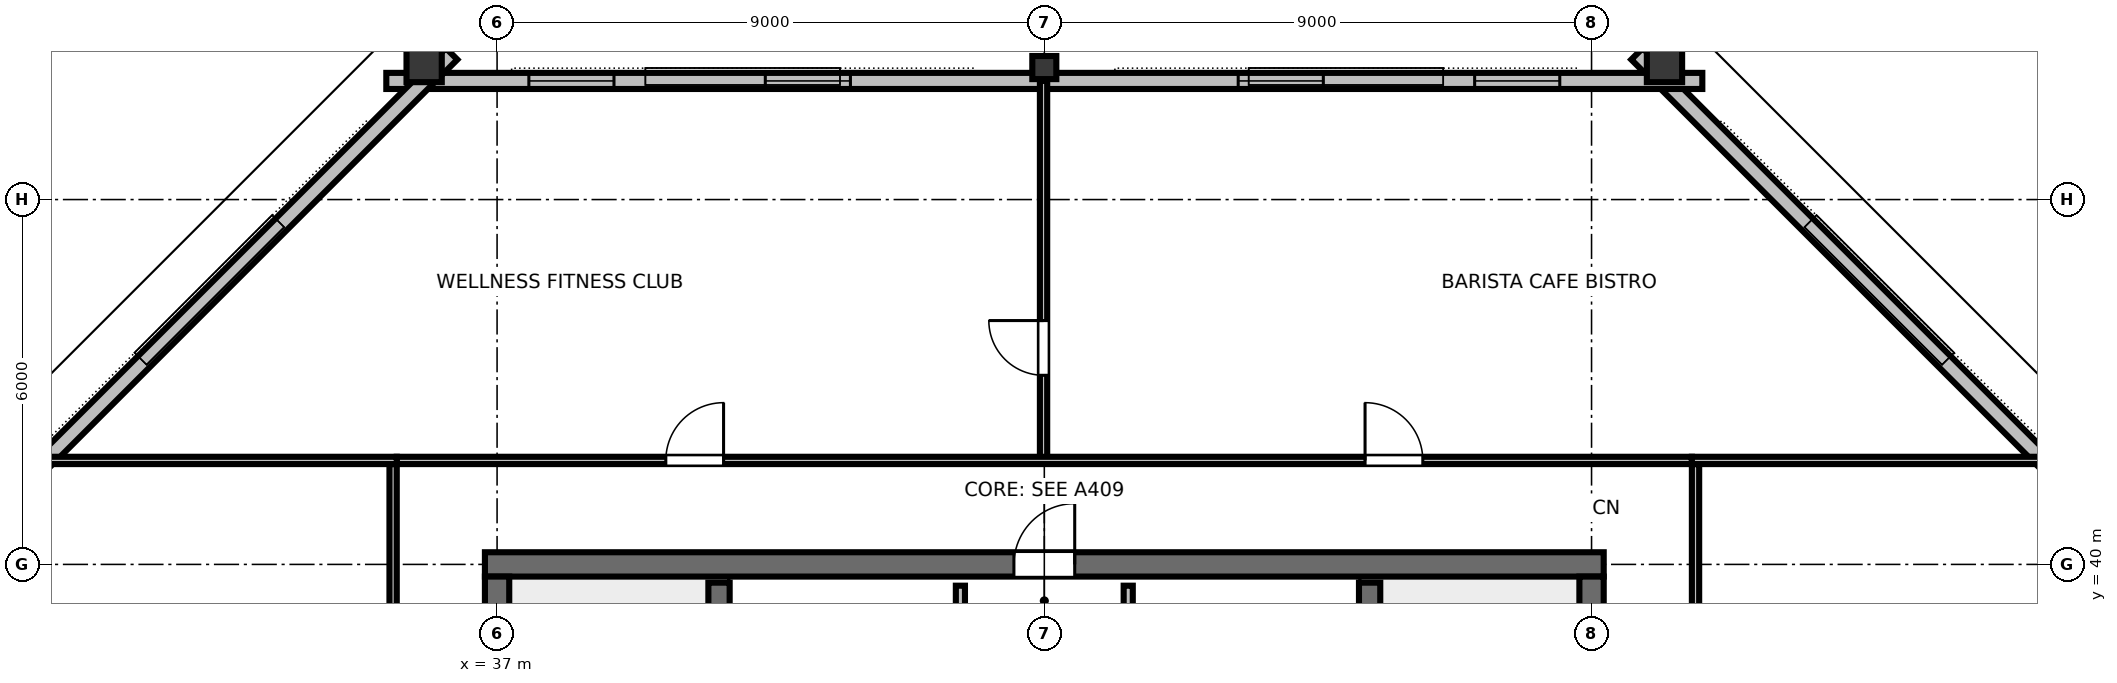
"""IFC4 building model, lengths in metres.
Left out: names, types, materials, properties, quantities, classifications, styles, units other than length and angle.
Written with IfcOpenShell. Run it as: python <this file> out.ifc"""

import sys

from ifc_helpers import new_model, si_unit, direction, frame, frame_2d, origin, origin_2d, place, context, subcontext, project, spatial, rectangle, hollow_rectangle, i_section, extrude, element, fill, save


model = new_model("IFC4")
c1 = context("Model", 3, precision=1e-05, world=origin(), true_north=direction((0.0, 1.0)))
c2 = subcontext(c1, "Body", "Model", "MODEL_VIEW")
j1 = project(units=[si_unit("LENGTHUNIT", "METRE"), si_unit("PLANEANGLEUNIT", "RADIAN")], contexts=[c1])
p1 = place(None, origin())
s1 = spatial("IfcSite", under=j1, at=p1, CompositionType="ELEMENT")
p2 = place(p1, origin())
s2 = spatial("IfcBuilding", under=s1, at=p2, CompositionType="ELEMENT")
p3 = place(p2, frame((0.0, 0.0, 275.4)))
s3 = spatial("IfcBuildingStorey", under=s2, at=p3, CompositionType="ELEMENT", Elevation=275.4)
p4 = place(p3, frame((36.8, 40.0, 0.0), z_axis=(0.0, 0.0, 1.0), x_axis=(1.0, 0.0, 0.0)))
e1 = element("IfcWall", 1, at=p4, inside=s3, PredefinedType="SHEAR", context=c2, shape_type="SweptSolid", body=[
    extrude(rectangle(XDim=18.4, YDim=0.4, at=frame_2d((9.2, 0.0))), origin(), (0.0, 0.0, 1.0), 3.28),
])
p5 = place(p4, frame((8.7, 0.0, 0.0)))
e2 = element("IfcOpeningElement", 2, at=p5, cuts=e1, PredefinedType="OPENING", context=c2, shape_type="SweptSolid", body=[
    extrude(rectangle(XDim=1.0, YDim=2.15, at=frame_2d((0.5, 1.075))), frame((0.0, 0.21, 0.0), z_axis=(0.0, -1.0, 0.0), x_axis=(1.0, 0.0, 0.0)), (0.0, 0.0, 1.0), 0.42),
])
p6 = place(p3, frame((37.0, 24.2, 0.0), z_axis=(0.0, 0.0, 1.0), x_axis=(0.0, 1.0, 0.0)))
e3 = element("IfcWall", 3, at=p6, inside=s3, PredefinedType="SHEAR", context=c2, shape_type="SweptSolid", body=[
    extrude(rectangle(XDim=15.6, YDim=0.4, at=frame_2d((7.8, 0.0))), origin(), (0.0, 0.0, 1.0), 3.28),
])
p7 = place(p6, frame((5.325, 0.0, 0.0)))
e4 = element("IfcOpeningElement", 4, at=p7, cuts=e3, PredefinedType="OPENING", context=c2, shape_type="SweptSolid", body=[
    extrude(rectangle(XDim=1.15, YDim=2.15, at=frame_2d((0.575, 1.075))), frame((0.0, 0.21, 0.0), z_axis=(0.0, -1.0, 0.0), x_axis=(1.0, 0.0, 0.0)), (0.0, 0.0, 1.0), 0.42),
])
p8 = place(p3, frame((55.0, 24.2, 0.0), z_axis=(0.0, 0.0, 1.0), x_axis=(0.0, 1.0, 0.0)))
e5 = element("IfcWall", 5, at=p8, inside=s3, PredefinedType="SHEAR", context=c2, shape_type="SweptSolid", body=[
    extrude(rectangle(XDim=15.6, YDim=0.4, at=frame_2d((7.8, 0.0))), origin(), (0.0, 0.0, 1.0), 3.28),
])
p9 = place(p8, frame((5.325, 0.0, 0.0)))
e6 = element("IfcOpeningElement", 6, at=p9, cuts=e5, PredefinedType="OPENING", context=c2, shape_type="SweptSolid", body=[
    extrude(rectangle(XDim=1.15, YDim=2.15, at=frame_2d((0.575, 1.075))), frame((0.0, 0.21, 0.0), z_axis=(0.0, -1.0, 0.0), x_axis=(1.0, 0.0, 0.0)), (0.0, 0.0, 1.0), 0.42),
])
p10 = place(p3, frame((56.2, 48.281, 0.0), z_axis=(-0.143355432569, -0.089514056813, 0.985614759217), x_axis=(0.529645364944, -0.848219185938, 0.0)))
e7 = element("IfcColumn", 7, at=p10, inside=s3, PredefinedType="COLUMN", context=c2, shape_type="SweptSolid", body=[
    extrude(hollow_rectangle(XDim=0.58, YDim=0.7, WallThickness=0.032, at=origin_2d()), origin(), (0.0, 0.0, 1.0), 3.306),
])
p11 = place(p3, frame((46.0, 48.171, 0.0), z_axis=(0.0, -0.088967639141, 0.996034517065), x_axis=(1.0, 0.0, 0.0)))
e8 = element("IfcColumn", 8, at=p11, inside=s3, PredefinedType="COLUMN", context=c2, shape_type="SweptSolid", body=[
    extrude(i_section(OverallWidth=0.395, OverallDepth=0.38, WebThickness=0.019, FlangeThickness=0.03, FilletRadius=0.025, at=origin_2d()), origin(), (0.0, 0.0, 1.0), 3.271),
])
p12 = place(p3, frame((35.8, 48.281, 0.0), z_axis=(0.143355432569, -0.089514056813, 0.985614759217), x_axis=(0.529645364944, 0.848219185938, 0.0)))
e9 = element("IfcColumn", 9, at=p12, inside=s3, PredefinedType="COLUMN", context=c2, shape_type="SweptSolid", body=[
    extrude(hollow_rectangle(XDim=0.58, YDim=0.7, WallThickness=0.032, at=origin_2d()), origin(), (0.0, 0.0, 1.0), 3.306),
])
p13 = place(p3, frame((63.614, 40.529, 0.0), z_axis=(0.0, 0.0, 1.0), x_axis=(-0.707106781187, 0.707106781187, 0.0)))
e10 = element("IfcWall", 10, at=p13, inside=s3, PredefinedType="STANDARD", context=c2, shape_type="SweptSolid", body=[
    extrude(rectangle(XDim=11.125, YDim=0.265, at=frame_2d((5.562, 0.0))), origin(), (0.0, 0.0, 1.0), 2.717),
])
p14 = place(p3, frame((56.822, 47.951, 0.0), z_axis=(0.0, 0.0, 1.0), x_axis=(-1.0, 0.0, 0.0)))
e11 = element("IfcWall", 11, at=p14, inside=s3, PredefinedType="STANDARD", context=c2, shape_type="SweptSolid", body=[
    extrude(rectangle(XDim=21.644, YDim=0.265, at=frame_2d((10.822, 0.0))), origin(), (0.0, 0.0, 1.0), 2.717),
])
p15 = place(p14, frame((2.344, 0.0, 0.85)))
e12 = element("IfcOpeningElement", 12, at=p15, cuts=e11, PredefinedType="OPENING", context=c2, shape_type="SweptSolid", body=[
    extrude(rectangle(XDim=1.4, YDim=1.2, at=frame_2d((0.7, 0.6))), frame((0.0, 0.142, 0.0), z_axis=(0.0, -1.0, 0.0), x_axis=(1.0, 0.0, 0.0)), (0.0, 0.0, 1.0), 0.285),
])
p16 = place(p14, frame((6.233, 0.0, 0.85)))
e13 = element("IfcOpeningElement", 13, at=p16, cuts=e11, PredefinedType="OPENING", context=c2, shape_type="SweptSolid", body=[
    extrude(rectangle(XDim=1.4, YDim=1.2, at=frame_2d((0.7, 0.6))), frame((0.0, 0.142, 0.0), z_axis=(0.0, -1.0, 0.0), x_axis=(1.0, 0.0, 0.0)), (0.0, 0.0, 1.0), 0.285),
])
p17 = place(p14, frame((14.01, 0.0, 0.85)))
e14 = element("IfcOpeningElement", 14, at=p17, cuts=e11, PredefinedType="OPENING", context=c2, shape_type="SweptSolid", body=[
    extrude(rectangle(XDim=1.4, YDim=1.2, at=frame_2d((0.7, 0.6))), frame((0.0, 0.142, 0.0), z_axis=(0.0, -1.0, 0.0), x_axis=(1.0, 0.0, 0.0)), (0.0, 0.0, 1.0), 0.285),
])
p18 = place(p14, frame((17.899, 0.0, 0.85)))
e15 = element("IfcOpeningElement", 15, at=p18, cuts=e11, PredefinedType="OPENING", context=c2, shape_type="SweptSolid", body=[
    extrude(rectangle(XDim=1.4, YDim=1.2, at=frame_2d((0.7, 0.6))), frame((0.0, 0.142, 0.0), z_axis=(0.0, -1.0, 0.0), x_axis=(1.0, 0.0, 0.0)), (0.0, 0.0, 1.0), 0.285),
])
p19 = place(p3, frame((36.253, 48.396, 0.0), z_axis=(0.0, 0.0, 1.0), x_axis=(-0.707106781187, -0.707106781187, 0.0)))
e16 = element("IfcWall", 16, at=p19, inside=s3, PredefinedType="STANDARD", context=c2, shape_type="SweptSolid", body=[
    extrude(rectangle(XDim=11.125, YDim=0.265, at=frame_2d((5.562, 0.0))), origin(), (0.0, 0.0, 1.0), 2.717),
])
for number, where, z_axis, x_axis in (
    (17, (40.65, 32.0, 0.0), (0.0, 0.0, 1.0), (0.0, 1.0, 0.0)),
    (18, (51.35, 32.0, 0.0), (0.0, 0.0, 1.0), (0.0, 1.0, 0.0)),
):
    element("IfcWall", number, at=place(p3, frame(where, z_axis=z_axis, x_axis=x_axis)), inside=s3, PredefinedType="SHEAR", context=c2, shape_type="SweptSolid", body=[
        extrude(rectangle(XDim=7.7, YDim=0.35, at=frame_2d((3.85, 0.0))), origin(), (0.0, 0.0, 1.0), 3.6),
    ])
p20 = place(p3, frame((44.62, 35.72, 0.0), z_axis=(0.0, 0.0, 1.0), x_axis=(0.0, 1.0, 0.0)))
e19 = element("IfcWall", 19, at=p20, inside=s3, PredefinedType="PARTITIONING", context=c2, shape_type="SweptSolid", body=[
    extrude(rectangle(XDim=3.93, YDim=0.15, at=frame_2d((1.965, 0.0))), origin(), (0.0, 0.0, 1.0), 3.26),
])
p21 = place(p20, frame((1.5, 0.0, 0.0)))
e20 = element("IfcOpeningElement", 20, at=p21, cuts=e19, PredefinedType="OPENING", context=c2, shape_type="SweptSolid", body=[
    extrude(rectangle(XDim=0.9, YDim=2.15, at=frame_2d((0.45, 1.075))), frame((0.0, 0.085, 0.0), z_axis=(0.0, -1.0, 0.0), x_axis=(1.0, 0.0, 0.0)), (0.0, 0.0, 1.0), 0.17),
])
p22 = place(p3, frame((47.38, 35.72, 0.0), z_axis=(0.0, 0.0, 1.0), x_axis=(0.0, 1.0, 0.0)))
e21 = element("IfcWall", 21, at=p22, inside=s3, PredefinedType="PARTITIONING", context=c2, shape_type="SweptSolid", body=[
    extrude(rectangle(XDim=3.93, YDim=0.15, at=frame_2d((1.965, 0.0))), origin(), (0.0, 0.0, 1.0), 3.26),
])
p23 = place(p22, frame((1.5, 0.0, 0.0)))
e22 = element("IfcOpeningElement", 22, at=p23, cuts=e21, PredefinedType="OPENING", context=c2, shape_type="SweptSolid", body=[
    extrude(rectangle(XDim=0.9, YDim=2.15, at=frame_2d((0.45, 1.075))), frame((0.0, 0.085, 0.0), z_axis=(0.0, -1.0, 0.0), x_axis=(1.0, 0.0, 0.0)), (0.0, 0.0, 1.0), 0.17),
])
p24 = place(p3, frame((45.987, 41.71, 0.0), z_axis=(0.0, 0.0, 1.0), x_axis=(0.0, 1.0, 0.0)))
e23 = element("IfcWall", 23, at=p24, inside=s3, PredefinedType="PARTITIONING", context=c2, shape_type="SweptSolid", body=[
    extrude(rectangle(XDim=6.241, YDim=0.12, at=frame_2d((3.121, 0.0))), origin(), (0.0, 0.0, 1.0), 2.54),
])
p25 = place(p24, frame((1.4, 0.0, 0.0)))
e24 = element("IfcOpeningElement", 24, at=p25, cuts=e23, PredefinedType="OPENING", context=c2, shape_type="SweptSolid", body=[
    extrude(rectangle(XDim=0.9, YDim=2.15, at=frame_2d((0.45, 1.075))), frame((0.0, 0.07, 0.0), z_axis=(0.0, -1.0, 0.0), x_axis=(1.0, 0.0, 0.0)), (0.0, 0.0, 1.0), 0.14),
])
p26 = place(p3, frame((35.35, 41.71, 0.0), z_axis=(0.0, 0.0, 1.0), x_axis=(1.0, 0.0, 0.0)))
e25 = element("IfcWall", 25, at=p26, inside=s3, PredefinedType="PARTITIONING", context=c2, shape_type="SweptSolid", body=[
    extrude(rectangle(XDim=21.3, YDim=0.12, at=frame_2d((10.65, 0.0))), origin(), (0.0, 0.0, 1.0), 2.54),
])
p27 = place(p26, frame((4.425, 0.0, 0.0)))
e26 = element("IfcOpeningElement", 26, at=p27, cuts=e25, PredefinedType="OPENING", context=c2, shape_type="SweptSolid", body=[
    extrude(rectangle(XDim=0.95, YDim=2.15, at=frame_2d((0.475, 1.075))), frame((0.0, 0.07, 0.0), z_axis=(0.0, -1.0, 0.0), x_axis=(1.0, 0.0, 0.0)), (0.0, 0.0, 1.0), 0.14),
])
p28 = place(p26, frame((15.925, 0.0, 0.0)))
e27 = element("IfcOpeningElement", 27, at=p28, cuts=e25, PredefinedType="OPENING", context=c2, shape_type="SweptSolid", body=[
    extrude(rectangle(XDim=0.95, YDim=2.15, at=frame_2d((0.475, 1.075))), frame((0.0, 0.07, 0.0), z_axis=(0.0, -1.0, 0.0), x_axis=(1.0, 0.0, 0.0)), (0.0, 0.0, 1.0), 0.14),
])
p29 = place(p3, frame((35.29, 22.35, 0.0), z_axis=(0.0, 0.0, 1.0), x_axis=(0.0, 1.0, 0.0)))
e28 = element("IfcWall", 28, at=p29, inside=s3, PredefinedType="PARTITIONING", context=c2, shape_type="SweptSolid", body=[
    extrude(rectangle(XDim=19.3, YDim=0.12, at=frame_2d((9.65, 0.0))), origin(), (0.0, 0.0, 1.0), 2.54),
])
p30 = place(p29, frame((4.201, 0.0, 0.0)))
e29 = element("IfcOpeningElement", 29, at=p30, cuts=e28, PredefinedType="OPENING", context=c2, shape_type="SweptSolid", body=[
    extrude(rectangle(XDim=0.95, YDim=2.15, at=frame_2d((0.475, 1.075))), frame((0.0, 0.07, 0.0), z_axis=(0.0, -1.0, 0.0), x_axis=(1.0, 0.0, 0.0)), (0.0, 0.0, 1.0), 0.14),
])
p31 = place(p29, frame((13.651, 0.0, 0.0)))
e30 = element("IfcOpeningElement", 30, at=p31, cuts=e28, PredefinedType="OPENING", context=c2, shape_type="SweptSolid", body=[
    extrude(rectangle(XDim=0.95, YDim=2.15, at=frame_2d((0.475, 1.075))), frame((0.0, 0.07, 0.0), z_axis=(0.0, -1.0, 0.0), x_axis=(1.0, 0.0, 0.0)), (0.0, 0.0, 1.0), 0.14),
])
p32 = place(p3, frame((56.71, 22.35, 0.0), z_axis=(0.0, 0.0, 1.0), x_axis=(0.0, 1.0, 0.0)))
e31 = element("IfcWall", 31, at=p32, inside=s3, PredefinedType="PARTITIONING", context=c2, shape_type="SweptSolid", body=[
    extrude(rectangle(XDim=19.3, YDim=0.12, at=frame_2d((9.65, 0.0))), origin(), (0.0, 0.0, 1.0), 2.54),
])
p33 = place(p32, frame((5.823, 0.0, 0.0)))
e32 = element("IfcOpeningElement", 32, at=p33, cuts=e31, PredefinedType="OPENING", context=c2, shape_type="SweptSolid", body=[
    extrude(rectangle(XDim=0.95, YDim=2.15, at=frame_2d((0.475, 1.075))), frame((0.0, 0.07, 0.0), z_axis=(0.0, -1.0, 0.0), x_axis=(1.0, 0.0, 0.0)), (0.0, 0.0, 1.0), 0.14),
])
p34 = place(p32, frame((15.272, 0.0, 0.0)))
e33 = element("IfcOpeningElement", 33, at=p34, cuts=e31, PredefinedType="OPENING", context=c2, shape_type="SweptSolid", body=[
    extrude(rectangle(XDim=0.95, YDim=2.15, at=frame_2d((0.475, 1.075))), frame((0.0, 0.07, 0.0), z_axis=(0.0, -1.0, 0.0), x_axis=(1.0, 0.0, 0.0)), (0.0, 0.0, 1.0), 0.14),
])
for number, where, z_axis, x_axis in (
    (34, (35.35, 41.71, 0.0), (0.0, 0.0, 1.0), (-1.0, 0.0, 0.0)),
    (35, (56.65, 41.71, 0.0), (0.0, 0.0, 1.0), (1.0, 0.0, 0.0)),
):
    element("IfcWall", number, at=place(p3, frame(where, z_axis=z_axis, x_axis=x_axis)), inside=s3, PredefinedType="PARTITIONING", context=c2, shape_type="SweptSolid", body=[
        extrude(rectangle(XDim=5.783, YDim=0.12, at=frame_2d((2.892, 0.0))), origin(), (0.0, 0.0, 1.0), 2.54),
    ])
p35 = place(p15, origin())
e36 = element("IfcWindow", 36, at=p35, inside=s3, PartitioningType="SINGLE_PANEL", PredefinedType="WINDOW", context=c2, shape_type="SweptSolid", body=[
    extrude(rectangle(XDim=1.4, YDim=1.2, at=frame_2d((0.7, 0.6))), frame((0.0, 0.03, 0.0), z_axis=(0.0, -1.0, 0.0), x_axis=(1.0, 0.0, 0.0)), (0.0, 0.0, 1.0), 0.06),
])
fill(e12, e36)
p36 = place(p16, origin())
e37 = element("IfcWindow", 37, at=p36, inside=s3, PartitioningType="SINGLE_PANEL", PredefinedType="WINDOW", context=c2, shape_type="SweptSolid", body=[
    extrude(rectangle(XDim=1.4, YDim=1.2, at=frame_2d((0.7, 0.6))), frame((0.0, 0.03, 0.0), z_axis=(0.0, -1.0, 0.0), x_axis=(1.0, 0.0, 0.0)), (0.0, 0.0, 1.0), 0.06),
])
fill(e13, e37)
p37 = place(p17, origin())
e38 = element("IfcWindow", 38, at=p37, inside=s3, PartitioningType="SINGLE_PANEL", PredefinedType="WINDOW", context=c2, shape_type="SweptSolid", body=[
    extrude(rectangle(XDim=1.4, YDim=1.2, at=frame_2d((0.7, 0.6))), frame((0.0, 0.03, 0.0), z_axis=(0.0, -1.0, 0.0), x_axis=(1.0, 0.0, 0.0)), (0.0, 0.0, 1.0), 0.06),
])
fill(e14, e38)
p38 = place(p18, origin())
e39 = element("IfcWindow", 39, at=p38, inside=s3, PartitioningType="SINGLE_PANEL", PredefinedType="WINDOW", context=c2, shape_type="SweptSolid", body=[
    extrude(rectangle(XDim=1.4, YDim=1.2, at=frame_2d((0.7, 0.6))), frame((0.0, 0.03, 0.0), z_axis=(0.0, -1.0, 0.0), x_axis=(1.0, 0.0, 0.0)), (0.0, 0.0, 1.0), 0.06),
])
fill(e15, e39)
p39 = place(p5, origin())
e40 = element("IfcDoor", 40, at=p39, inside=s3, OperationType="SINGLE_SWING_RIGHT", PredefinedType="DOOR", context=c2, shape_type="SweptSolid", body=[
    extrude(rectangle(XDim=1.0, YDim=2.15, at=frame_2d((0.5, 1.075))), frame((0.0, 0.025, 0.0), z_axis=(0.0, -1.0, 0.0), x_axis=(1.0, 0.0, 0.0)), (0.0, 0.0, 1.0), 0.05),
])
fill(e2, e40)
p40 = place(p25, origin())
e41 = element("IfcDoor", 41, at=p40, inside=s3, OperationType="SINGLE_SWING_RIGHT", PredefinedType="DOOR", context=c2, shape_type="SweptSolid", body=[
    extrude(rectangle(XDim=0.9, YDim=2.15, at=frame_2d((0.45, 1.075))), frame((0.0, 0.025, 0.0), z_axis=(0.0, -1.0, 0.0), x_axis=(1.0, 0.0, 0.0)), (0.0, 0.0, 1.0), 0.05),
])
fill(e24, e41)
p41 = place(p27, origin())
e42 = element("IfcDoor", 42, at=p41, inside=s3, OperationType="SINGLE_SWING_RIGHT", PredefinedType="DOOR", context=c2, shape_type="SweptSolid", body=[
    extrude(rectangle(XDim=0.95, YDim=2.15, at=frame_2d((0.475, 1.075))), frame((0.0, 0.025, 0.0), z_axis=(0.0, -1.0, 0.0), x_axis=(1.0, 0.0, 0.0)), (0.0, 0.0, 1.0), 0.05),
])
fill(e26, e42)
p42 = place(p28, origin())
e43 = element("IfcDoor", 43, at=p42, inside=s3, OperationType="SINGLE_SWING_LEFT", PredefinedType="DOOR", context=c2, shape_type="SweptSolid", body=[
    extrude(rectangle(XDim=0.95, YDim=2.15, at=frame_2d((0.475, 1.075))), frame((0.0, 0.025, 0.0), z_axis=(0.0, -1.0, 0.0), x_axis=(1.0, 0.0, 0.0)), (0.0, 0.0, 1.0), 0.05),
])
fill(e27, e43)
save(model, sys.argv[1])
